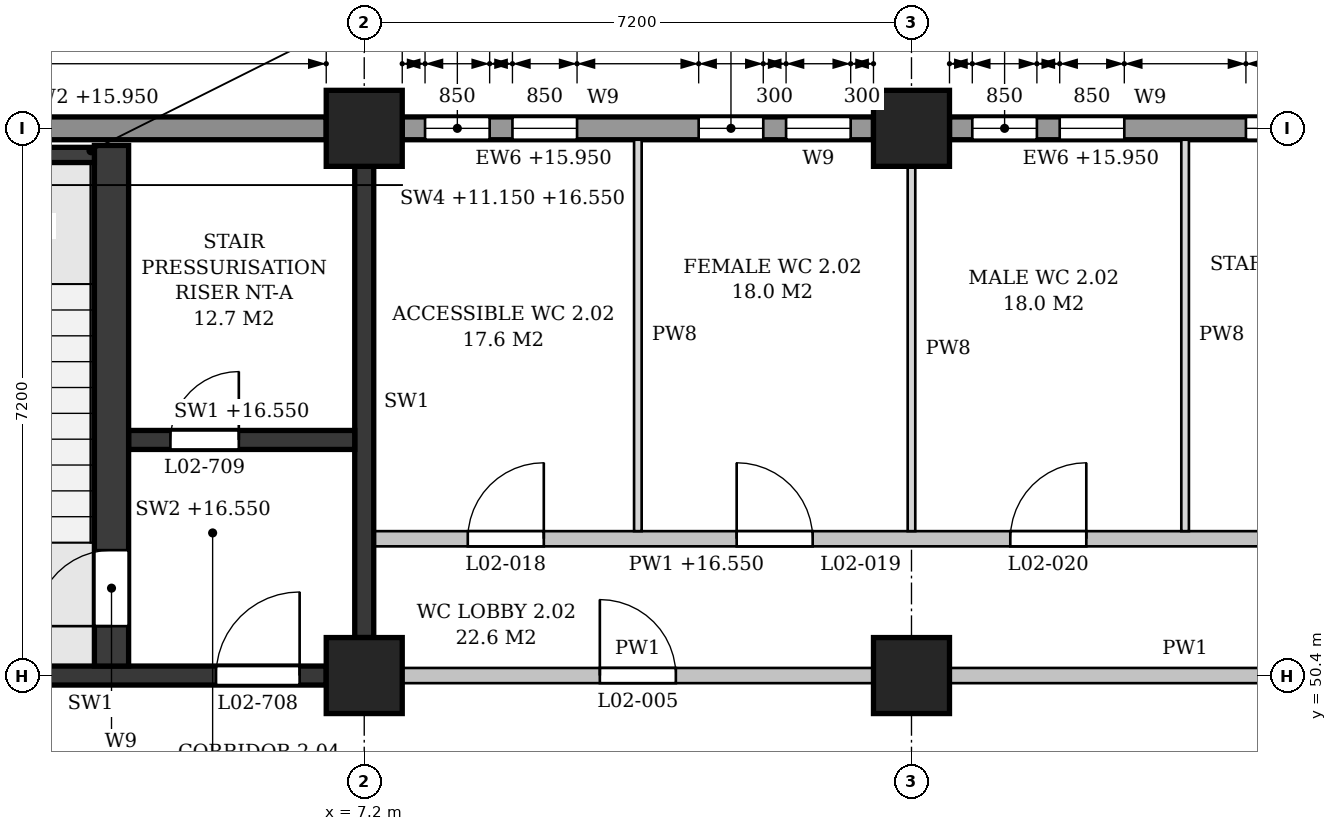
"""IFC4 building model, lengths in metres.
Left out: names, types, materials, properties, quantities, classifications, styles, units other than length and angle.
Written with IfcOpenShell. Run it as: python <this file> out.ifc"""

import sys

from ifc_helpers import new_model, si_unit, direction, frame, frame_2d, origin, origin_2d, place, context, subcontext, project, spatial, polyline, rectangle, outline, extrude, element, fill, save


model = new_model("IFC4")
c1 = context("Model", 3, precision=1e-05, world=origin(), true_north=direction((0.0, 1.0)))
c2 = subcontext(c1, "Body", "Model", "MODEL_VIEW")
j1 = project(units=[si_unit("LENGTHUNIT", "METRE"), si_unit("PLANEANGLEUNIT", "RADIAN")], contexts=[c1])
p1 = place(None, origin())
s1 = spatial("IfcSite", under=j1, at=p1, CompositionType="ELEMENT")
p2 = place(p1, origin())
s2 = spatial("IfcBuilding", under=s1, at=p2, CompositionType="ELEMENT")
p3 = place(p2, frame((0.0, 0.0, 11.4)))
s3 = spatial("IfcBuildingStorey", under=s2, at=p3, CompositionType="ELEMENT", Elevation=11.4)
for number, where, z_axis, x_axis in (
    (1, (7.2, 50.4, 0.0), (0.0, 0.0, 1.0), (1.0, 0.0, 0.0)),
    (2, (7.2, 57.6, 0.0), (0.0, 0.0, 1.0), (1.0, 0.0, 0.0)),
    (3, (14.4, 50.4, 0.0), (0.0, 0.0, 1.0), (1.0, 0.0, 0.0)),
    (4, (14.4, 57.6, 0.0), (0.0, 0.0, 1.0), (1.0, 0.0, 0.0)),
):
    element("IfcColumn", number, at=place(p3, frame(where, z_axis=z_axis, x_axis=x_axis)), inside=s3, PredefinedType="COLUMN", context=c2, shape_type="SweptSolid", body=[
        extrude(rectangle(XDim=1.0, YDim=1.0, at=origin_2d()), origin(), (0.0, 0.0, 1.0), 5.4),
    ])
p4 = place(p3, frame((21.1, 57.6, 0.0), z_axis=(0.0, 0.0, 1.0), x_axis=(-1.0, 0.0, 0.0)))
e5 = element("IfcWall", 5, at=p4, inside=s3, PredefinedType="STANDARD", context=c2, shape_type="SweptSolid", body=[
    extrude(rectangle(XDim=6.2, YDim=0.3, at=frame_2d((3.1, 0.0))), origin(), (0.0, 0.0, 1.0), 4.55),
])
p5 = place(p4, frame((0.3, 0.0, 0.9)))
e6 = element("IfcOpeningElement", 6, at=p5, cuts=e5, PredefinedType="OPENING", context=c2, shape_type="SweptSolid", body=[
    extrude(outline(polyline([(0.0, 0.0), (0.85, 0.0), (0.85, 2.65), (0.425, 3.1), (0.0, 2.65), (0.0, 0.0)])), frame((0.0, 0.16, 0.0), z_axis=(0.0, -1.0, 0.0), x_axis=(1.0, 0.0, 0.0)), (0.0, 0.0, 1.0), 0.32),
])
p6 = place(p4, frame((1.45, 0.0, 0.9)))
e7 = element("IfcOpeningElement", 7, at=p6, cuts=e5, PredefinedType="OPENING", context=c2, shape_type="SweptSolid", body=[
    extrude(outline(polyline([(0.0, 0.0), (0.85, 0.0), (0.85, 2.65), (0.425, 3.1), (0.0, 2.65), (0.0, 0.0)])), frame((0.0, 0.16, 0.0), z_axis=(0.0, -1.0, 0.0), x_axis=(1.0, 0.0, 0.0)), (0.0, 0.0, 1.0), 0.32),
])
p7 = place(p4, frame((3.9, 0.0, 0.9)))
e8 = element("IfcOpeningElement", 8, at=p7, cuts=e5, PredefinedType="OPENING", context=c2, shape_type="SweptSolid", body=[
    extrude(outline(polyline([(0.0, 0.0), (0.85, 0.0), (0.85, 2.65), (0.425, 3.1), (0.0, 2.65), (0.0, 0.0)])), frame((0.0, 0.16, 0.0), z_axis=(0.0, -1.0, 0.0), x_axis=(1.0, 0.0, 0.0)), (0.0, 0.0, 1.0), 0.32),
])
p8 = place(p4, frame((5.05, 0.0, 0.9)))
e9 = element("IfcOpeningElement", 9, at=p8, cuts=e5, PredefinedType="OPENING", context=c2, shape_type="SweptSolid", body=[
    extrude(outline(polyline([(0.0, 0.0), (0.85, 0.0), (0.85, 2.65), (0.425, 3.1), (0.0, 2.65), (0.0, 0.0)])), frame((0.0, 0.16, 0.0), z_axis=(0.0, -1.0, 0.0), x_axis=(1.0, 0.0, 0.0)), (0.0, 0.0, 1.0), 0.32),
])
p9 = place(p3, frame((13.9, 57.6, 0.0), z_axis=(0.0, 0.0, 1.0), x_axis=(-1.0, 0.0, 0.0)))
e10 = element("IfcWall", 10, at=p9, inside=s3, PredefinedType="STANDARD", context=c2, shape_type="SweptSolid", body=[
    extrude(rectangle(XDim=6.2, YDim=0.3, at=frame_2d((3.1, 0.0))), origin(), (0.0, 0.0, 1.0), 4.55),
])
p10 = place(p9, frame((0.3, 0.0, 0.9)))
e11 = element("IfcOpeningElement", 11, at=p10, cuts=e10, PredefinedType="OPENING", context=c2, shape_type="SweptSolid", body=[
    extrude(outline(polyline([(0.0, 0.0), (0.85, 0.0), (0.85, 2.65), (0.425, 3.1), (0.0, 2.65), (0.0, 0.0)])), frame((0.0, 0.16, 0.0), z_axis=(0.0, -1.0, 0.0), x_axis=(1.0, 0.0, 0.0)), (0.0, 0.0, 1.0), 0.32),
])
p11 = place(p9, frame((1.45, 0.0, 0.9)))
e12 = element("IfcOpeningElement", 12, at=p11, cuts=e10, PredefinedType="OPENING", context=c2, shape_type="SweptSolid", body=[
    extrude(outline(polyline([(0.0, 0.0), (0.85, 0.0), (0.85, 2.65), (0.425, 3.1), (0.0, 2.65), (0.0, 0.0)])), frame((0.0, 0.16, 0.0), z_axis=(0.0, -1.0, 0.0), x_axis=(1.0, 0.0, 0.0)), (0.0, 0.0, 1.0), 0.32),
])
p12 = place(p9, frame((3.9, 0.0, 0.9)))
e13 = element("IfcOpeningElement", 13, at=p12, cuts=e10, PredefinedType="OPENING", context=c2, shape_type="SweptSolid", body=[
    extrude(outline(polyline([(0.0, 0.0), (0.85, 0.0), (0.85, 2.65), (0.425, 3.1), (0.0, 2.65), (0.0, 0.0)])), frame((0.0, 0.16, 0.0), z_axis=(0.0, -1.0, 0.0), x_axis=(1.0, 0.0, 0.0)), (0.0, 0.0, 1.0), 0.32),
])
p13 = place(p9, frame((5.05, 0.0, 0.9)))
e14 = element("IfcOpeningElement", 14, at=p13, cuts=e10, PredefinedType="OPENING", context=c2, shape_type="SweptSolid", body=[
    extrude(outline(polyline([(0.0, 0.0), (0.85, 0.0), (0.85, 2.65), (0.425, 3.1), (0.0, 2.65), (0.0, 0.0)])), frame((0.0, 0.16, 0.0), z_axis=(0.0, -1.0, 0.0), x_axis=(1.0, 0.0, 0.0)), (0.0, 0.0, 1.0), 0.32),
])
p14 = place(p3, frame((6.7, 57.6, 0.0), z_axis=(0.0, 0.0, 1.0), x_axis=(-1.0, 0.0, 0.0)))
e15 = element("IfcWall", 15, at=p14, inside=s3, PredefinedType="STANDARD", context=c2, shape_type="SweptSolid", body=[
    extrude(rectangle(XDim=6.2, YDim=0.3, at=frame_2d((3.1, 0.0))), origin(), (0.0, 0.0, 1.0), 4.55),
])
p15 = place(p14, frame((4.45, 0.0, 0.9)))
e16 = element("IfcOpeningElement", 16, at=p15, cuts=e15, PredefinedType="OPENING", context=c2, shape_type="SweptSolid", body=[
    extrude(outline(polyline([(0.0, 0.0), (0.9, 0.0), (0.9, 2.65), (0.45, 3.1), (0.0, 2.65), (0.0, 0.0)])), frame((0.0, 0.16, 0.0), z_axis=(0.0, -1.0, 0.0), x_axis=(1.0, 0.0, 0.0)), (0.0, 0.0, 1.0), 0.32),
])
p16 = place(p3, frame((0.5, 50.4, 0.0), z_axis=(0.0, 0.0, 1.0), x_axis=(1.0, 0.0, 0.0)))
e17 = element("IfcWall", 17, at=p16, inside=s3, PredefinedType="SHEAR", context=c2, shape_type="SweptSolid", body=[
    extrude(rectangle(XDim=6.2, YDim=0.25, at=frame_2d((3.1, 0.0))), origin(), (0.0, 0.0, 1.0), 4.4),
])
p17 = place(p16, frame((4.75, 0.0, 0.0)))
e18 = element("IfcOpeningElement", 18, at=p17, cuts=e17, PredefinedType="OPENING", context=c2, shape_type="SweptSolid", body=[
    extrude(rectangle(XDim=1.1, YDim=2.1, at=frame_2d((0.55, 1.05))), frame((0.0, 0.135, 0.0), z_axis=(0.0, -1.0, 0.0), x_axis=(1.0, 0.0, 0.0)), (0.0, 0.0, 1.0), 0.27),
])
p18 = place(p3, frame((7.2, 50.9, 0.0), z_axis=(0.0, 0.0, 1.0), x_axis=(0.0, 1.0, 0.0)))
e19 = element("IfcWall", 19, at=p18, inside=s3, PredefinedType="SHEAR", context=c2, shape_type="SweptSolid", body=[
    extrude(rectangle(XDim=6.2, YDim=0.25, at=frame_2d((3.1, 0.0))), origin(), (0.0, 0.0, 1.0), 4.4),
])
p19 = place(p3, frame((2.25, 57.25, -0.25), z_axis=(0.0, 0.0, 1.0), x_axis=(1.0, 0.0, 0.0)))
e20 = element("IfcWall", 20, at=p19, inside=s3, PredefinedType="SHEAR", context=c2, shape_type="SweptSolid", body=[
    extrude(rectangle(XDim=1.4, YDim=0.2, at=frame_2d((0.7, 0.0))), origin(), (0.0, 0.0, 1.0), 5.4),
])
p20 = place(p3, frame((3.875, 50.525, 0.0), z_axis=(0.0, 0.0, 1.0), x_axis=(0.0, 1.0, 0.0)))
e21 = element("IfcWall", 21, at=p20, inside=s3, PredefinedType="SHEAR", context=c2, shape_type="SweptSolid", body=[
    extrude(rectangle(XDim=6.85, YDim=0.45, at=frame_2d((3.425, 0.0))), origin(), (0.0, 0.0, 1.0), 5.15),
])
p21 = place(p20, frame((0.525, 0.0, 0.0)))
e22 = element("IfcOpeningElement", 22, at=p21, cuts=e21, PredefinedType="OPENING", context=c2, shape_type="SweptSolid", body=[
    extrude(rectangle(XDim=1.0, YDim=2.1, at=frame_2d((0.5, 1.05))), frame((0.0, 0.235, 0.0), z_axis=(0.0, -1.0, 0.0), x_axis=(1.0, 0.0, 0.0)), (0.0, 0.0, 1.0), 0.47),
])
p22 = place(p3, frame((4.1, 53.5, 0.0), z_axis=(0.0, 0.0, 1.0), x_axis=(1.0, 0.0, 0.0)))
e23 = element("IfcWall", 23, at=p22, inside=s3, PredefinedType="SHEAR", context=c2, shape_type="SweptSolid", body=[
    extrude(rectangle(XDim=2.975, YDim=0.25, at=frame_2d((1.487, 0.0))), origin(), (0.0, 0.0, 1.0), 5.15),
])
p23 = place(p22, frame((0.55, 0.0, 0.0)))
e24 = element("IfcOpeningElement", 24, at=p23, cuts=e23, PredefinedType="OPENING", context=c2, shape_type="SweptSolid", body=[
    extrude(rectangle(XDim=0.9, YDim=2.1, at=frame_2d((0.45, 1.05))), frame((0.0, 0.135, 0.0), z_axis=(0.0, -1.0, 0.0), x_axis=(1.0, 0.0, 0.0)), (0.0, 0.0, 1.0), 0.27),
])
p24 = place(p3, frame((7.7, 50.4, 0.0), z_axis=(0.0, 0.0, 1.0), x_axis=(1.0, 0.0, 0.0)))
e25 = element("IfcWall", 25, at=p24, inside=s3, PredefinedType="PARTITIONING", context=c2, shape_type="SweptSolid", body=[
    extrude(rectangle(XDim=6.2, YDim=0.2, at=frame_2d((3.1, 0.0))), origin(), (0.0, 0.0, 1.0), 4.4),
])
p25 = place(p24, frame((2.6, 0.0, 0.0)))
e26 = element("IfcOpeningElement", 26, at=p25, cuts=e25, PredefinedType="OPENING", context=c2, shape_type="SweptSolid", body=[
    extrude(rectangle(XDim=1.0, YDim=2.1, at=frame_2d((0.5, 1.05))), frame((0.0, 0.11, 0.0), z_axis=(0.0, -1.0, 0.0), x_axis=(1.0, 0.0, 0.0)), (0.0, 0.0, 1.0), 0.22),
])
p26 = place(p3, frame((14.9, 50.4, 0.0), z_axis=(0.0, 0.0, 1.0), x_axis=(1.0, 0.0, 0.0)))
e27 = element("IfcWall", 27, at=p26, inside=s3, PredefinedType="PARTITIONING", context=c2, shape_type="SweptSolid", body=[
    extrude(rectangle(XDim=6.2, YDim=0.2, at=frame_2d((3.1, 0.0))), origin(), (0.0, 0.0, 1.0), 4.4),
])
p27 = place(p26, frame((4.15, 0.0, 0.0)))
e28 = element("IfcOpeningElement", 28, at=p27, cuts=e27, PredefinedType="OPENING", context=c2, shape_type="SweptSolid", body=[
    extrude(rectangle(XDim=1.0, YDim=2.1, at=frame_2d((0.5, 1.05))), frame((0.0, 0.11, 0.0), z_axis=(0.0, -1.0, 0.0), x_axis=(1.0, 0.0, 0.0)), (0.0, 0.0, 1.0), 0.22),
])
p28 = place(p3, frame((7.325, 52.2, 0.0), z_axis=(0.0, 0.0, 1.0), x_axis=(1.0, 0.0, 0.0)))
e29 = element("IfcWall", 29, at=p28, inside=s3, PredefinedType="PARTITIONING", context=c2, shape_type="SweptSolid", body=[
    extrude(outline(polyline([(0.0, 0.0), (14.15, 0.0), (14.15, 4.4), (14.025, 4.4), (14.025, 5.15), (7.325, 5.15), (7.325, 4.4), (6.825, 4.4), (6.825, 5.15), (0.125, 5.15), (0.125, 4.4), (0.0, 4.4), (0.0, 0.0)])), frame((0.0, 0.1, 0.0), z_axis=(0.0, -1.0, 0.0), x_axis=(1.0, 0.0, 0.0)), (0.0, 0.0, 1.0), 0.2),
])
p29 = place(p28, frame((1.238, 0.0, 0.0)))
e30 = element("IfcOpeningElement", 30, at=p29, cuts=e29, PredefinedType="OPENING", context=c2, shape_type="SweptSolid", body=[
    extrude(rectangle(XDim=1.0, YDim=2.1, at=frame_2d((0.5, 1.05))), frame((0.0, 0.11, 0.0), z_axis=(0.0, -1.0, 0.0), x_axis=(1.0, 0.0, 0.0)), (0.0, 0.0, 1.0), 0.22),
])
p30 = place(p28, frame((4.775, 0.0, 0.0)))
e31 = element("IfcOpeningElement", 31, at=p30, cuts=e29, PredefinedType="OPENING", context=c2, shape_type="SweptSolid", body=[
    extrude(rectangle(XDim=1.0, YDim=2.1, at=frame_2d((0.5, 1.05))), frame((0.0, 0.11, 0.0), z_axis=(0.0, -1.0, 0.0), x_axis=(1.0, 0.0, 0.0)), (0.0, 0.0, 1.0), 0.22),
])
p31 = place(p28, frame((8.375, 0.0, 0.0)))
e32 = element("IfcOpeningElement", 32, at=p31, cuts=e29, PredefinedType="OPENING", context=c2, shape_type="SweptSolid", body=[
    extrude(rectangle(XDim=1.0, YDim=2.1, at=frame_2d((0.5, 1.05))), frame((0.0, 0.11, 0.0), z_axis=(0.0, -1.0, 0.0), x_axis=(1.0, 0.0, 0.0)), (0.0, 0.0, 1.0), 0.22),
])
p32 = place(p28, frame((11.913, 0.0, 0.0)))
e33 = element("IfcOpeningElement", 33, at=p32, cuts=e29, PredefinedType="OPENING", context=c2, shape_type="SweptSolid", body=[
    extrude(rectangle(XDim=1.0, YDim=2.1, at=frame_2d((0.5, 1.05))), frame((0.0, 0.11, 0.0), z_axis=(0.0, -1.0, 0.0), x_axis=(1.0, 0.0, 0.0)), (0.0, 0.0, 1.0), 0.22),
])
p33 = place(p3, frame((10.8, 52.3, 0.0), z_axis=(0.0, 0.0, 1.0), x_axis=(0.0, 1.0, 0.0)))
e34 = element("IfcWall", 34, at=p33, inside=s3, PredefinedType="PARTITIONING", context=c2, shape_type="SweptSolid", body=[
    extrude(rectangle(XDim=5.15, YDim=0.1, at=frame_2d((2.575, 0.0))), origin(), (0.0, 0.0, 1.0), 4.4),
])
p34 = place(p3, frame((14.4, 52.3, 0.0), z_axis=(0.0, 0.0, 1.0), x_axis=(0.0, 1.0, 0.0)))
e35 = element("IfcWall", 35, at=p34, inside=s3, PredefinedType="PARTITIONING", context=c2, shape_type="SweptSolid", body=[
    extrude(rectangle(XDim=4.8, YDim=0.1, at=frame_2d((2.4, 0.0))), origin(), (0.0, 0.0, 1.0), 4.4),
])
p35 = place(p3, frame((18.0, 52.3, 0.0), z_axis=(0.0, 0.0, 1.0), x_axis=(0.0, 1.0, 0.0)))
e36 = element("IfcWall", 36, at=p35, inside=s3, PredefinedType="PARTITIONING", context=c2, shape_type="SweptSolid", body=[
    extrude(rectangle(XDim=5.15, YDim=0.1, at=frame_2d((2.575, 0.0))), origin(), (0.0, 0.0, 1.0), 4.4),
])
p36 = place(p6, origin())
e37 = element("IfcWindow", 37, at=p36, inside=s3, PartitioningType="SINGLE_PANEL", PredefinedType="WINDOW", context=c2, shape_type="SweptSolid", body=[
    extrude(outline(polyline([(0.0, 0.0), (0.85, 0.0), (0.85, 2.65), (0.425, 3.1), (0.0, 2.65), (0.0, 0.0)])), frame((0.0, 0.03, 0.0), z_axis=(0.0, -1.0, 0.0), x_axis=(1.0, 0.0, 0.0)), (0.0, 0.0, 1.0), 0.06),
])
fill(e7, e37)
p37 = place(p7, origin())
e38 = element("IfcWindow", 38, at=p37, inside=s3, PartitioningType="SINGLE_PANEL", PredefinedType="WINDOW", context=c2, shape_type="SweptSolid", body=[
    extrude(outline(polyline([(0.0, 0.0), (0.85, 0.0), (0.85, 2.65), (0.425, 3.1), (0.0, 2.65), (0.0, 0.0)])), frame((0.0, 0.03, 0.0), z_axis=(0.0, -1.0, 0.0), x_axis=(1.0, 0.0, 0.0)), (0.0, 0.0, 1.0), 0.06),
])
fill(e8, e38)
p38 = place(p8, origin())
e39 = element("IfcWindow", 39, at=p38, inside=s3, PartitioningType="SINGLE_PANEL", PredefinedType="WINDOW", context=c2, shape_type="SweptSolid", body=[
    extrude(outline(polyline([(0.0, 0.0), (0.85, 0.0), (0.85, 2.65), (0.425, 3.1), (0.0, 2.65), (0.0, 0.0)])), frame((0.0, 0.03, 0.0), z_axis=(0.0, -1.0, 0.0), x_axis=(1.0, 0.0, 0.0)), (0.0, 0.0, 1.0), 0.06),
])
fill(e9, e39)
p39 = place(p10, origin())
e40 = element("IfcWindow", 40, at=p39, inside=s3, PartitioningType="SINGLE_PANEL", PredefinedType="WINDOW", context=c2, shape_type="SweptSolid", body=[
    extrude(outline(polyline([(0.0, 0.0), (0.85, 0.0), (0.85, 2.65), (0.425, 3.1), (0.0, 2.65), (0.0, 0.0)])), frame((0.0, 0.03, 0.0), z_axis=(0.0, -1.0, 0.0), x_axis=(1.0, 0.0, 0.0)), (0.0, 0.0, 1.0), 0.06),
])
fill(e11, e40)
p40 = place(p11, origin())
e41 = element("IfcWindow", 41, at=p40, inside=s3, PartitioningType="SINGLE_PANEL", PredefinedType="WINDOW", context=c2, shape_type="SweptSolid", body=[
    extrude(outline(polyline([(0.0, 0.0), (0.85, 0.0), (0.85, 2.65), (0.425, 3.1), (0.0, 2.65), (0.0, 0.0)])), frame((0.0, 0.03, 0.0), z_axis=(0.0, -1.0, 0.0), x_axis=(1.0, 0.0, 0.0)), (0.0, 0.0, 1.0), 0.06),
])
fill(e12, e41)
p41 = place(p12, origin())
e42 = element("IfcWindow", 42, at=p41, inside=s3, PartitioningType="SINGLE_PANEL", PredefinedType="WINDOW", context=c2, shape_type="SweptSolid", body=[
    extrude(outline(polyline([(0.0, 0.0), (0.85, 0.0), (0.85, 2.65), (0.425, 3.1), (0.0, 2.65), (0.0, 0.0)])), frame((0.0, 0.03, 0.0), z_axis=(0.0, -1.0, 0.0), x_axis=(1.0, 0.0, 0.0)), (0.0, 0.0, 1.0), 0.06),
])
fill(e13, e42)
p42 = place(p13, origin())
e43 = element("IfcWindow", 43, at=p42, inside=s3, PartitioningType="SINGLE_PANEL", PredefinedType="WINDOW", context=c2, shape_type="SweptSolid", body=[
    extrude(outline(polyline([(0.0, 0.0), (0.85, 0.0), (0.85, 2.65), (0.425, 3.1), (0.0, 2.65), (0.0, 0.0)])), frame((0.0, 0.03, 0.0), z_axis=(0.0, -1.0, 0.0), x_axis=(1.0, 0.0, 0.0)), (0.0, 0.0, 1.0), 0.06),
])
fill(e14, e43)
p43 = place(p21, origin())
e44 = element("IfcDoor", 44, at=p43, inside=s3, OperationType="SINGLE_SWING_LEFT", PredefinedType="DOOR", context=c2, shape_type="SweptSolid", body=[
    extrude(rectangle(XDim=1.0, YDim=2.1, at=frame_2d((0.5, 1.05))), frame((0.0, 0.025, 0.0), z_axis=(0.0, -1.0, 0.0), x_axis=(1.0, 0.0, 0.0)), (0.0, 0.0, 1.0), 0.05),
])
fill(e22, e44)
p44 = place(p17, origin())
e45 = element("IfcDoor", 45, at=p44, inside=s3, OperationType="SINGLE_SWING_RIGHT", PredefinedType="DOOR", context=c2, shape_type="SweptSolid", body=[
    extrude(rectangle(XDim=1.1, YDim=2.1, at=frame_2d((0.55, 1.05))), frame((0.0, 0.025, 0.0), z_axis=(0.0, -1.0, 0.0), x_axis=(1.0, 0.0, 0.0)), (0.0, 0.0, 1.0), 0.05),
])
fill(e18, e45)
p45 = place(p23, origin())
e46 = element("IfcDoor", 46, at=p45, inside=s3, OperationType="SINGLE_SWING_RIGHT", PredefinedType="DOOR", context=c2, shape_type="SweptSolid", body=[
    extrude(rectangle(XDim=0.9, YDim=2.1, at=frame_2d((0.45, 1.05))), frame((0.0, 0.025, 0.0), z_axis=(0.0, -1.0, 0.0), x_axis=(1.0, 0.0, 0.0)), (0.0, 0.0, 1.0), 0.05),
])
fill(e24, e46)
p46 = place(p25, origin())
e47 = element("IfcDoor", 47, at=p46, inside=s3, OperationType="SINGLE_SWING_LEFT", PredefinedType="DOOR", context=c2, shape_type="SweptSolid", body=[
    extrude(rectangle(XDim=1.0, YDim=2.1, at=frame_2d((0.5, 1.05))), frame((0.0, 0.025, 0.0), z_axis=(0.0, -1.0, 0.0), x_axis=(1.0, 0.0, 0.0)), (0.0, 0.0, 1.0), 0.05),
])
fill(e26, e47)
p47 = place(p29, origin())
e48 = element("IfcDoor", 48, at=p47, inside=s3, OperationType="SINGLE_SWING_RIGHT", PredefinedType="DOOR", context=c2, shape_type="SweptSolid", body=[
    extrude(rectangle(XDim=1.0, YDim=2.1, at=frame_2d((0.5, 1.05))), frame((0.0, 0.025, 0.0), z_axis=(0.0, -1.0, 0.0), x_axis=(1.0, 0.0, 0.0)), (0.0, 0.0, 1.0), 0.05),
])
fill(e30, e48)
p48 = place(p30, origin())
e49 = element("IfcDoor", 49, at=p48, inside=s3, OperationType="SINGLE_SWING_LEFT", PredefinedType="DOOR", context=c2, shape_type="SweptSolid", body=[
    extrude(rectangle(XDim=1.0, YDim=2.1, at=frame_2d((0.5, 1.05))), frame((0.0, 0.025, 0.0), z_axis=(0.0, -1.0, 0.0), x_axis=(1.0, 0.0, 0.0)), (0.0, 0.0, 1.0), 0.05),
])
fill(e31, e49)
p49 = place(p31, origin())
e50 = element("IfcDoor", 50, at=p49, inside=s3, OperationType="SINGLE_SWING_RIGHT", PredefinedType="DOOR", context=c2, shape_type="SweptSolid", body=[
    extrude(rectangle(XDim=1.0, YDim=2.1, at=frame_2d((0.5, 1.05))), frame((0.0, 0.025, 0.0), z_axis=(0.0, -1.0, 0.0), x_axis=(1.0, 0.0, 0.0)), (0.0, 0.0, 1.0), 0.05),
])
fill(e32, e50)
save(model, sys.argv[1])
